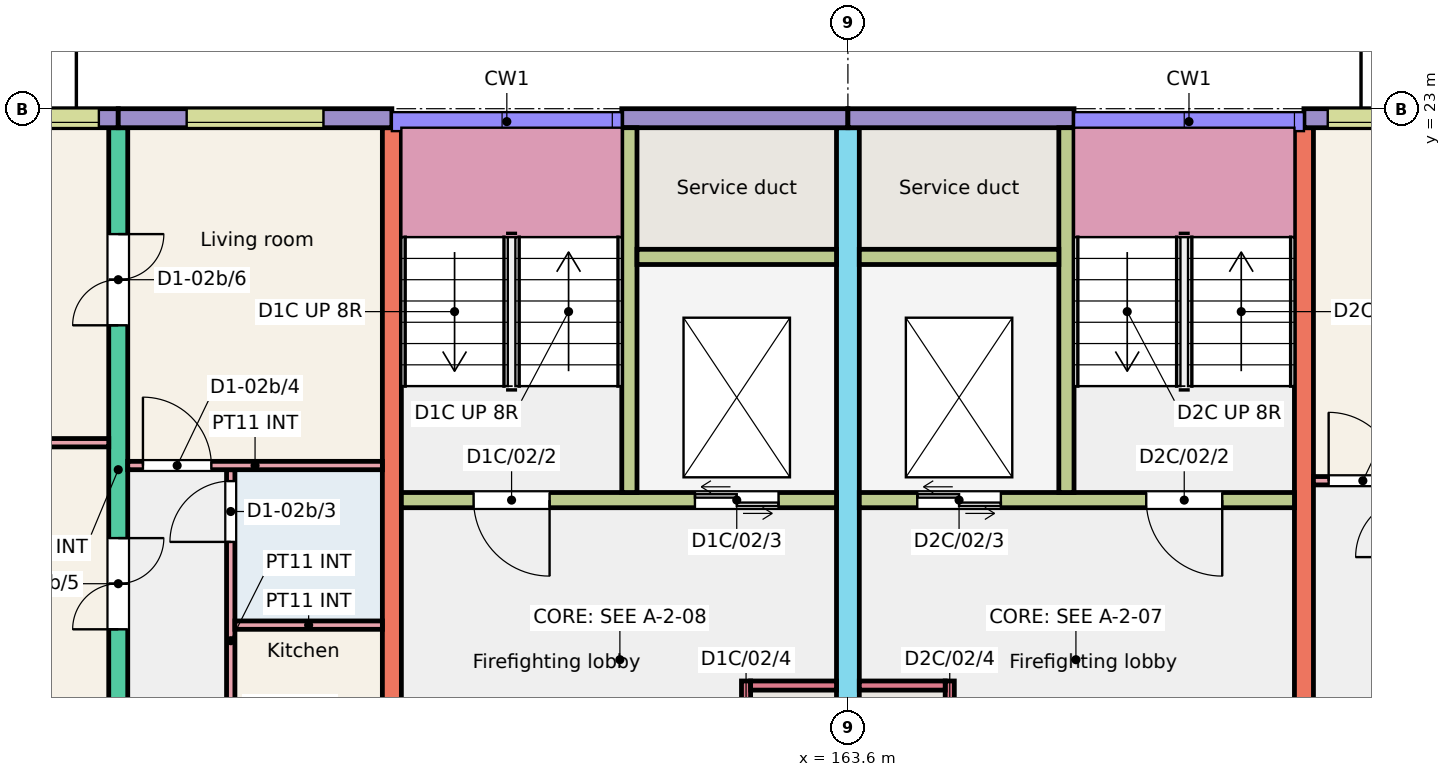
"""IFC4 building model, lengths in metres.
Left out: names, types, materials, properties, quantities, classifications, styles, units other than length and angle.
Written with IfcOpenShell. Run it as: python <this file> out.ifc"""

import sys

from ifc_helpers import new_model, si_unit, direction, frame, frame_2d, origin, place, context, subcontext, project, spatial, rectangle, extrude, element, fill, save


model = new_model("IFC4")
c1 = context("Model", 3, precision=1e-05, world=origin(), true_north=direction((0.0, 1.0)))
c2 = subcontext(c1, "Body", "Model", "MODEL_VIEW")
j1 = project(units=[si_unit("LENGTHUNIT", "METRE"), si_unit("PLANEANGLEUNIT", "RADIAN")], contexts=[c1])
p1 = place(None, origin())
s1 = spatial("IfcSite", under=j1, at=p1, CompositionType="ELEMENT")
p2 = place(p1, origin())
s2 = spatial("IfcBuilding", under=s1, at=p2, CompositionType="ELEMENT")
p3 = place(p2, frame((0.0, 0.0, 6.0)))
s3 = spatial("IfcBuildingStorey", under=s2, at=p3, CompositionType="ELEMENT", Elevation=6.0)
p4 = place(p3, frame((154.0, 13.75, 0.0), z_axis=(0.0, 0.0, 1.0), x_axis=(0.0, 1.0, 0.0)))
e1 = element("IfcWall", 1, at=p4, inside=s3, PredefinedType="SHEAR", context=c2, shape_type="SweptSolid", body=[
    extrude(rectangle(XDim=9.0, YDim=0.25, at=frame_2d((4.5, 0.0))), origin(), (0.0, 0.0, 1.0), 3.0),
])
p5 = place(p4, frame((2.4, 0.0, 0.0)))
e2 = element("IfcOpeningElement", 2, at=p5, cuts=e1, PredefinedType="OPENING", context=c2, shape_type="SweptSolid", body=[
    extrude(rectangle(XDim=1.2, YDim=2.1, at=frame_2d((0.6, 1.05))), frame((0.0, 0.135, 0.0), z_axis=(0.0, -1.0, 0.0), x_axis=(1.0, 0.0, 0.0)), (0.0, 0.0, 1.0), 0.27),
])
p6 = place(p4, frame((6.4, 0.0, 0.0)))
e3 = element("IfcOpeningElement", 3, at=p6, cuts=e1, PredefinedType="OPENING", context=c2, shape_type="SweptSolid", body=[
    extrude(rectangle(XDim=1.2, YDim=2.1, at=frame_2d((0.6, 1.05))), frame((0.0, 0.135, 0.0), z_axis=(0.0, -1.0, 0.0), x_axis=(1.0, 0.0, 0.0)), (0.0, 0.0, 1.0), 0.27),
])
p7 = place(p3, frame((157.6, 13.75, 0.0), z_axis=(0.0, 0.0, 1.0), x_axis=(0.0, 1.0, 0.0)))
e4 = element("IfcWall", 4, at=p7, inside=s3, PredefinedType="SHEAR", context=c2, shape_type="SweptSolid", body=[
    extrude(rectangle(XDim=9.0, YDim=0.25, at=frame_2d((4.5, 0.0))), origin(), (0.0, 0.0, 1.0), 3.0),
])
p8 = place(p3, frame((163.6, 11.75, 0.0), z_axis=(0.0, 0.0, 1.0), x_axis=(0.0, 1.0, 0.0)))
e5 = element("IfcWall", 5, at=p8, inside=s3, PredefinedType="SHEAR", context=c2, shape_type="SweptSolid", body=[
    extrude(rectangle(XDim=11.0, YDim=0.3, at=frame_2d((5.5, 0.0))), origin(), (0.0, 0.0, 1.0), 3.0),
])
p9 = place(p8, frame((0.3, 0.0, 0.0)))
e6 = element("IfcOpeningElement", 6, at=p9, cuts=e5, PredefinedType="OPENING", context=c2, shape_type="SweptSolid", body=[
    extrude(rectangle(XDim=1.2, YDim=2.1, at=frame_2d((0.6, 1.05))), frame((0.0, 0.16, 0.0), z_axis=(0.0, -1.0, 0.0), x_axis=(1.0, 0.0, 0.0)), (0.0, 0.0, 1.0), 0.32),
])
p10 = place(p3, frame((169.6, 13.75, 0.0), z_axis=(0.0, 0.0, 1.0), x_axis=(0.0, 1.0, 0.0)))
e7 = element("IfcWall", 7, at=p10, inside=s3, PredefinedType="SHEAR", context=c2, shape_type="SweptSolid", body=[
    extrude(rectangle(XDim=9.0, YDim=0.25, at=frame_2d((4.5, 0.0))), origin(), (0.0, 0.0, 1.0), 3.0),
])
p11 = place(p3, frame((150.4, 22.875, 0.0), z_axis=(0.0, 0.0, 1.0), x_axis=(1.0, 0.0, 0.0)))
e8 = element("IfcWall", 8, at=p11, inside=s3, PredefinedType="SOLIDWALL", context=c2, shape_type="SweptSolid", body=[
    extrude(rectangle(XDim=3.6, YDim=0.25, at=frame_2d((1.8, 0.0))), origin(), (0.0, 0.0, 1.0), 3.0),
])
p12 = place(p11, frame((1.545, 0.0, 1.1)))
e9 = element("IfcOpeningElement", 9, at=p12, cuts=e8, PredefinedType="OPENING", context=c2, shape_type="SweptSolid", body=[
    extrude(rectangle(XDim=1.8, YDim=1.3, at=frame_2d((0.9, 0.65))), frame((0.0, 0.135, 0.0), z_axis=(0.0, -1.0, 0.0), x_axis=(1.0, 0.0, 0.0)), (0.0, 0.0, 1.0), 0.27),
])
p13 = place(p11, frame((0.315, 0.0, 0.0)))
e10 = element("IfcOpeningElement", 10, at=p13, cuts=e8, PredefinedType="OPENING", context=c2, shape_type="SweptSolid", body=[
    extrude(rectangle(XDim=1.0, YDim=2.1, at=frame_2d((0.5, 1.05))), frame((0.0, 0.135, 0.0), z_axis=(0.0, -1.0, 0.0), x_axis=(1.0, 0.0, 0.0)), (0.0, 0.0, 1.0), 0.27),
])
p14 = place(p3, frame((154.0, 22.875, 0.0), z_axis=(0.0, 0.0, 1.0), x_axis=(1.0, 0.0, 0.0)))
e11 = element("IfcWall", 11, at=p14, inside=s3, PredefinedType="SOLIDWALL", context=c2, shape_type="SweptSolid", body=[
    extrude(rectangle(XDim=3.6, YDim=0.25, at=frame_2d((1.8, 0.0))), origin(), (0.0, 0.0, 1.0), 3.0),
])
p15 = place(p14, frame((0.9, 0.0, 1.1)))
e12 = element("IfcOpeningElement", 12, at=p15, cuts=e11, PredefinedType="OPENING", context=c2, shape_type="SweptSolid", body=[
    extrude(rectangle(XDim=1.8, YDim=1.3, at=frame_2d((0.9, 0.65))), frame((0.0, 0.135, 0.0), z_axis=(0.0, -1.0, 0.0), x_axis=(1.0, 0.0, 0.0)), (0.0, 0.0, 1.0), 0.27),
])
p16 = place(p3, frame((160.625, 22.875, 0.0), z_axis=(0.0, 0.0, 1.0), x_axis=(1.0, 0.0, 0.0)))
e13 = element("IfcWall", 13, at=p16, inside=s3, PredefinedType="SOLIDWALL", context=c2, shape_type="SweptSolid", body=[
    extrude(rectangle(XDim=2.975, YDim=0.25, at=frame_2d((1.488, 0.0))), origin(), (0.0, 0.0, 1.0), 3.0),
])
p17 = place(p3, frame((157.725, 17.85, 0.0), z_axis=(0.0, 0.0, 1.0), x_axis=(1.0, 0.0, 0.0)))
e14 = element("IfcWall", 14, at=p17, inside=s3, PredefinedType="SHEAR", context=c2, shape_type="SweptSolid", body=[
    extrude(rectangle(XDim=5.725, YDim=0.2, at=frame_2d((2.862, 0.0))), origin(), (0.0, 0.0, 1.0), 3.0),
])
p18 = place(p17, frame((0.95, 0.0, 0.0)))
e15 = element("IfcOpeningElement", 15, at=p18, cuts=e14, PredefinedType="OPENING", context=c2, shape_type="SweptSolid", body=[
    extrude(rectangle(XDim=1.0, YDim=2.1, at=frame_2d((0.5, 1.05))), frame((0.0, 0.11, 0.0), z_axis=(0.0, -1.0, 0.0), x_axis=(1.0, 0.0, 0.0)), (0.0, 0.0, 1.0), 0.22),
])
p19 = place(p17, frame((3.863, 0.0, 0.0)))
e16 = element("IfcOpeningElement", 16, at=p19, cuts=e14, PredefinedType="OPENING", context=c2, shape_type="SweptSolid", body=[
    extrude(rectangle(XDim=1.1, YDim=2.1, at=frame_2d((0.55, 1.05))), frame((0.0, 0.11, 0.0), z_axis=(0.0, -1.0, 0.0), x_axis=(1.0, 0.0, 0.0)), (0.0, 0.0, 1.0), 0.22),
])
p20 = place(p3, frame((160.725, 17.95, 0.0), z_axis=(0.0, 0.0, 1.0), x_axis=(0.0, 1.0, 0.0)))
e17 = element("IfcWall", 17, at=p20, inside=s3, PredefinedType="SHEAR", context=c2, shape_type="SweptSolid", body=[
    extrude(rectangle(XDim=4.8, YDim=0.2, at=frame_2d((2.4, 0.0))), origin(), (0.0, 0.0, 1.0), 3.0),
])
p21 = place(p3, frame((160.825, 21.05, 0.0), z_axis=(0.0, 0.0, 1.0), x_axis=(1.0, 0.0, 0.0)))
e18 = element("IfcWall", 18, at=p21, inside=s3, PredefinedType="SHEAR", context=c2, shape_type="SweptSolid", body=[
    extrude(rectangle(XDim=2.625, YDim=0.2, at=frame_2d((1.312, 0.0))), origin(), (0.0, 0.0, 1.0), 3.0),
])
p22 = place(p3, frame((162.26, 13.75, 0.0), z_axis=(0.0, 0.0, 1.0), x_axis=(0.0, 1.0, 0.0)))
e19 = element("IfcWall", 19, at=p22, inside=s3, PredefinedType="SHEAR", context=c2, shape_type="SweptSolid", body=[
    extrude(rectangle(XDim=1.72, YDim=0.12, at=frame_2d((0.86, 0.0))), origin(), (0.0, 0.0, 1.0), 3.0),
])
p23 = place(p22, frame((0.45, 0.0, 0.0)))
e20 = element("IfcOpeningElement", 20, at=p23, cuts=e19, PredefinedType="OPENING", context=c2, shape_type="SweptSolid", body=[
    extrude(rectangle(XDim=0.9, YDim=2.1, at=frame_2d((0.45, 1.05))), frame((0.0, 0.07, 0.0), z_axis=(0.0, -1.0, 0.0), x_axis=(1.0, 0.0, 0.0)), (0.0, 0.0, 1.0), 0.14),
])
p24 = place(p3, frame((162.32, 15.41, 0.0), z_axis=(0.0, 0.0, 1.0), x_axis=(1.0, 0.0, 0.0)))
e21 = element("IfcWall", 21, at=p24, inside=s3, PredefinedType="SHEAR", context=c2, shape_type="SweptSolid", body=[
    extrude(rectangle(XDim=1.13, YDim=0.12, at=frame_2d((0.565, 0.0))), origin(), (0.0, 0.0, 1.0), 3.0),
])
p25 = place(p3, frame((163.6, 22.875, 0.0), z_axis=(0.0, 0.0, 1.0), x_axis=(1.0, 0.0, 0.0)))
e22 = element("IfcWall", 22, at=p25, inside=s3, PredefinedType="SOLIDWALL", context=c2, shape_type="SweptSolid", body=[
    extrude(rectangle(XDim=2.975, YDim=0.25, at=frame_2d((1.487, 0.0))), origin(), (0.0, 0.0, 1.0), 3.0),
])
p26 = place(p3, frame((163.75, 17.85, 0.0), z_axis=(0.0, 0.0, 1.0), x_axis=(1.0, 0.0, 0.0)))
e23 = element("IfcWall", 23, at=p26, inside=s3, PredefinedType="SHEAR", context=c2, shape_type="SweptSolid", body=[
    extrude(rectangle(XDim=5.725, YDim=0.2, at=frame_2d((2.863, 0.0))), origin(), (0.0, 0.0, 1.0), 3.0),
])
p27 = place(p26, frame((3.775, 0.0, 0.0)))
e24 = element("IfcOpeningElement", 24, at=p27, cuts=e23, PredefinedType="OPENING", context=c2, shape_type="SweptSolid", body=[
    extrude(rectangle(XDim=1.0, YDim=2.1, at=frame_2d((0.5, 1.05))), frame((0.0, 0.11, 0.0), z_axis=(0.0, -1.0, 0.0), x_axis=(1.0, 0.0, 0.0)), (0.0, 0.0, 1.0), 0.22),
])
p28 = place(p26, frame((0.762, 0.0, 0.0)))
e25 = element("IfcOpeningElement", 25, at=p28, cuts=e23, PredefinedType="OPENING", context=c2, shape_type="SweptSolid", body=[
    extrude(rectangle(XDim=1.1, YDim=2.1, at=frame_2d((0.55, 1.05))), frame((0.0, 0.11, 0.0), z_axis=(0.0, -1.0, 0.0), x_axis=(1.0, 0.0, 0.0)), (0.0, 0.0, 1.0), 0.22),
])
p29 = place(p3, frame((166.475, 17.95, 0.0), z_axis=(0.0, 0.0, 1.0), x_axis=(0.0, 1.0, 0.0)))
e26 = element("IfcWall", 26, at=p29, inside=s3, PredefinedType="SHEAR", context=c2, shape_type="SweptSolid", body=[
    extrude(rectangle(XDim=4.8, YDim=0.2, at=frame_2d((2.4, 0.0))), origin(), (0.0, 0.0, 1.0), 3.0),
])
p30 = place(p3, frame((163.75, 21.05, 0.0), z_axis=(0.0, 0.0, 1.0), x_axis=(1.0, 0.0, 0.0)))
e27 = element("IfcWall", 27, at=p30, inside=s3, PredefinedType="SHEAR", context=c2, shape_type="SweptSolid", body=[
    extrude(rectangle(XDim=2.625, YDim=0.2, at=frame_2d((1.312, 0.0))), origin(), (0.0, 0.0, 1.0), 3.0),
])
p31 = place(p3, frame((164.94, 13.75, 0.0), z_axis=(0.0, 0.0, 1.0), x_axis=(0.0, 1.0, 0.0)))
e28 = element("IfcWall", 28, at=p31, inside=s3, PredefinedType="SHEAR", context=c2, shape_type="SweptSolid", body=[
    extrude(rectangle(XDim=1.72, YDim=0.12, at=frame_2d((0.86, 0.0))), origin(), (0.0, 0.0, 1.0), 3.0),
])
p32 = place(p31, frame((0.45, 0.0, 0.0)))
e29 = element("IfcOpeningElement", 29, at=p32, cuts=e28, PredefinedType="OPENING", context=c2, shape_type="SweptSolid", body=[
    extrude(rectangle(XDim=0.9, YDim=2.1, at=frame_2d((0.45, 1.05))), frame((0.0, 0.07, 0.0), z_axis=(0.0, -1.0, 0.0), x_axis=(1.0, 0.0, 0.0)), (0.0, 0.0, 1.0), 0.14),
])
p33 = place(p3, frame((163.75, 15.41, 0.0), z_axis=(0.0, 0.0, 1.0), x_axis=(1.0, 0.0, 0.0)))
e30 = element("IfcWall", 30, at=p33, inside=s3, PredefinedType="SHEAR", context=c2, shape_type="SweptSolid", body=[
    extrude(rectangle(XDim=1.13, YDim=0.12, at=frame_2d((0.565, 0.0))), origin(), (0.0, 0.0, 1.0), 3.0),
])
p34 = place(p3, frame((169.6, 22.875, 0.0), z_axis=(0.0, 0.0, 1.0), x_axis=(1.0, 0.0, 0.0)))
e31 = element("IfcWall", 31, at=p34, inside=s3, PredefinedType="SOLIDWALL", context=c2, shape_type="SweptSolid", body=[
    extrude(rectangle(XDim=3.6, YDim=0.25, at=frame_2d((1.8, 0.0))), origin(), (0.0, 0.0, 1.0), 3.0),
])
p35 = place(p34, frame((0.313, 0.0, 1.1)))
e32 = element("IfcOpeningElement", 32, at=p35, cuts=e31, PredefinedType="OPENING", context=c2, shape_type="SweptSolid", body=[
    extrude(rectangle(XDim=1.8, YDim=1.3, at=frame_2d((0.9, 0.65))), frame((0.0, 0.135, 0.0), z_axis=(0.0, -1.0, 0.0), x_axis=(1.0, 0.0, 0.0)), (0.0, 0.0, 1.0), 0.27),
])
p36 = place(p34, frame((2.401, 0.0, 0.0)))
e33 = element("IfcOpeningElement", 33, at=p36, cuts=e31, PredefinedType="OPENING", context=c2, shape_type="SweptSolid", body=[
    extrude(rectangle(XDim=1.0, YDim=2.1, at=frame_2d((0.5, 1.05))), frame((0.0, 0.135, 0.0), z_axis=(0.0, -1.0, 0.0), x_axis=(1.0, 0.0, 0.0)), (0.0, 0.0, 1.0), 0.27),
])
p37 = place(p3, frame((155.48, 13.75, 0.0), z_axis=(0.0, 0.0, 1.0), x_axis=(0.0, 1.0, 0.0)))
e34 = element("IfcWall", 34, at=p37, inside=s3, PredefinedType="PARTITIONING", context=c2, shape_type="SweptSolid", body=[
    extrude(rectangle(XDim=4.5, YDim=0.11, at=frame_2d((2.25, 0.0))), origin(), (0.0, 0.0, 1.0), 2.8),
])
p38 = place(p37, frame((0.2, 0.0, 0.0)))
e35 = element("IfcOpeningElement", 35, at=p38, cuts=e34, PredefinedType="OPENING", context=c2, shape_type="SweptSolid", body=[
    extrude(rectangle(XDim=0.8, YDim=2.1, at=frame_2d((0.4, 1.05))), frame((0.0, 0.065, 0.0), z_axis=(0.0, -1.0, 0.0), x_axis=(1.0, 0.0, 0.0)), (0.0, 0.0, 1.0), 0.13),
])
p39 = place(p37, frame((3.55, 0.0, 0.0)))
e36 = element("IfcOpeningElement", 36, at=p39, cuts=e34, PredefinedType="OPENING", context=c2, shape_type="SweptSolid", body=[
    extrude(rectangle(XDim=0.8, YDim=2.1, at=frame_2d((0.4, 1.05))), frame((0.0, 0.065, 0.0), z_axis=(0.0, -1.0, 0.0), x_axis=(1.0, 0.0, 0.0)), (0.0, 0.0, 1.0), 0.13),
])
p40 = place(p3, frame((155.535, 16.205, 0.0), z_axis=(0.0, 0.0, 1.0), x_axis=(1.0, 0.0, 0.0)))
e37 = element("IfcWall", 37, at=p40, inside=s3, PredefinedType="PARTITIONING", context=c2, shape_type="SweptSolid", body=[
    extrude(rectangle(XDim=1.94, YDim=0.11, at=frame_2d((0.97, 0.0))), origin(), (0.0, 0.0, 1.0), 2.8),
])
p41 = place(p3, frame((154.125, 18.305, 0.0), z_axis=(0.0, 0.0, 1.0), x_axis=(1.0, 0.0, 0.0)))
e38 = element("IfcWall", 38, at=p41, inside=s3, PredefinedType="PARTITIONING", context=c2, shape_type="SweptSolid", body=[
    extrude(rectangle(XDim=3.35, YDim=0.11, at=frame_2d((1.675, 0.0))), origin(), (0.0, 0.0, 1.0), 2.8),
])
p42 = place(p41, frame((0.2, 0.0, 0.0)))
e39 = element("IfcOpeningElement", 39, at=p42, cuts=e38, PredefinedType="OPENING", context=c2, shape_type="SweptSolid", body=[
    extrude(rectangle(XDim=0.9, YDim=2.1, at=frame_2d((0.45, 1.05))), frame((0.0, 0.065, 0.0), z_axis=(0.0, -1.0, 0.0), x_axis=(1.0, 0.0, 0.0)), (0.0, 0.0, 1.0), 0.13),
])
p43 = place(p3, frame((150.5, 18.605, 0.0), z_axis=(0.0, 0.0, 1.0), x_axis=(1.0, 0.0, 0.0)))
e40 = element("IfcWall", 40, at=p43, inside=s3, PredefinedType="PARTITIONING", context=c2, shape_type="SweptSolid", body=[
    extrude(rectangle(XDim=3.375, YDim=0.11, at=frame_2d((1.688, 0.0))), origin(), (0.0, 0.0, 1.0), 2.8),
])
p44 = place(p3, frame((169.725, 18.105, 0.0), z_axis=(0.0, 0.0, 1.0), x_axis=(1.0, 0.0, 0.0)))
e41 = element("IfcWall", 41, at=p44, inside=s3, PredefinedType="PARTITIONING", context=c2, shape_type="SweptSolid", body=[
    extrude(rectangle(XDim=3.35, YDim=0.11, at=frame_2d((1.675, 0.0))), origin(), (0.0, 0.0, 1.0), 2.8),
])
p45 = place(p44, frame((0.2, 0.0, 0.0)))
e42 = element("IfcOpeningElement", 42, at=p45, cuts=e41, PredefinedType="OPENING", context=c2, shape_type="SweptSolid", body=[
    extrude(rectangle(XDim=0.9, YDim=2.1, at=frame_2d((0.45, 1.05))), frame((0.0, 0.065, 0.0), z_axis=(0.0, -1.0, 0.0), x_axis=(1.0, 0.0, 0.0)), (0.0, 0.0, 1.0), 0.13),
])
p46 = place(p12, origin())
e43 = element("IfcWindow", 43, at=p46, inside=s3, PartitioningType="SINGLE_PANEL", PredefinedType="WINDOW", context=c2, shape_type="SweptSolid", body=[
    extrude(rectangle(XDim=1.8, YDim=1.3, at=frame_2d((0.9, 0.65))), frame((0.0, -0.025, 0.0), z_axis=(0.0, -1.0, 0.0), x_axis=(1.0, 0.0, 0.0)), (0.0, 0.0, 1.0), 0.06),
])
fill(e9, e43)
p47 = place(p15, origin())
e44 = element("IfcWindow", 44, at=p47, inside=s3, PartitioningType="SINGLE_PANEL", PredefinedType="WINDOW", context=c2, shape_type="SweptSolid", body=[
    extrude(rectangle(XDim=1.8, YDim=1.3, at=frame_2d((0.9, 0.65))), frame((0.0, -0.025, 0.0), z_axis=(0.0, -1.0, 0.0), x_axis=(1.0, 0.0, 0.0)), (0.0, 0.0, 1.0), 0.06),
])
fill(e12, e44)
p48 = place(p35, origin())
e45 = element("IfcWindow", 45, at=p48, inside=s3, PartitioningType="SINGLE_PANEL", PredefinedType="WINDOW", context=c2, shape_type="SweptSolid", body=[
    extrude(rectangle(XDim=1.8, YDim=1.3, at=frame_2d((0.9, 0.65))), frame((0.0, -0.025, 0.0), z_axis=(0.0, -1.0, 0.0), x_axis=(1.0, 0.0, 0.0)), (0.0, 0.0, 1.0), 0.06),
])
fill(e32, e45)
p49 = place(p39, origin())
e46 = element("IfcDoor", 46, at=p49, inside=s3, OperationType="SINGLE_SWING_LEFT", PredefinedType="DOOR", context=c2, shape_type="SweptSolid", body=[
    extrude(rectangle(XDim=0.8, YDim=2.1, at=frame_2d((0.4, 1.05))), frame((0.0, 0.025, 0.0), z_axis=(0.0, -1.0, 0.0), x_axis=(1.0, 0.0, 0.0)), (0.0, 0.0, 1.0), 0.05),
])
fill(e36, e46)
p50 = place(p42, origin())
e47 = element("IfcDoor", 47, at=p50, inside=s3, OperationType="SINGLE_SWING_LEFT", PredefinedType="DOOR", context=c2, shape_type="SweptSolid", body=[
    extrude(rectangle(XDim=0.9, YDim=2.1, at=frame_2d((0.45, 1.05))), frame((0.0, 0.025, 0.0), z_axis=(0.0, -1.0, 0.0), x_axis=(1.0, 0.0, 0.0)), (0.0, 0.0, 1.0), 0.05),
])
fill(e39, e47)
p51 = place(p5, origin())
e48 = element("IfcDoor", 48, at=p51, inside=s3, OperationType="DOUBLE_DOOR_SINGLE_SWING", PredefinedType="DOOR", context=c2, shape_type="SweptSolid", body=[
    extrude(rectangle(XDim=1.2, YDim=2.1, at=frame_2d((0.6, 1.05))), frame((0.0, 0.025, 0.0), z_axis=(0.0, -1.0, 0.0), x_axis=(1.0, 0.0, 0.0)), (0.0, 0.0, 1.0), 0.05),
])
fill(e2, e48)
p52 = place(p6, origin())
e49 = element("IfcDoor", 49, at=p52, inside=s3, OperationType="DOUBLE_DOOR_SINGLE_SWING", PredefinedType="DOOR", context=c2, shape_type="SweptSolid", body=[
    extrude(rectangle(XDim=1.2, YDim=2.1, at=frame_2d((0.6, 1.05))), frame((0.0, 0.025, 0.0), z_axis=(0.0, -1.0, 0.0), x_axis=(1.0, 0.0, 0.0)), (0.0, 0.0, 1.0), 0.05),
])
fill(e3, e49)
p53 = place(p45, origin())
e50 = element("IfcDoor", 50, at=p53, inside=s3, OperationType="SINGLE_SWING_LEFT", PredefinedType="DOOR", context=c2, shape_type="SweptSolid", body=[
    extrude(rectangle(XDim=0.9, YDim=2.1, at=frame_2d((0.45, 1.05))), frame((0.0, 0.025, 0.0), z_axis=(0.0, -1.0, 0.0), x_axis=(1.0, 0.0, 0.0)), (0.0, 0.0, 1.0), 0.05),
])
fill(e42, e50)
p54 = place(p18, origin())
e51 = element("IfcDoor", 51, at=p54, inside=s3, OperationType="SINGLE_SWING_RIGHT", PredefinedType="DOOR", context=c2, shape_type="SweptSolid", body=[
    extrude(rectangle(XDim=1.0, YDim=2.1, at=frame_2d((0.5, 1.05))), frame((0.0, 0.025, 0.0), z_axis=(0.0, -1.0, 0.0), x_axis=(1.0, 0.0, 0.0)), (0.0, 0.0, 1.0), 0.05),
])
fill(e15, e51)
p55 = place(p19, origin())
e52 = element("IfcDoor", 52, at=p55, inside=s3, OperationType="DOUBLE_DOOR_SLIDING", PredefinedType="DOOR", context=c2, shape_type="SweptSolid", body=[
    extrude(rectangle(XDim=1.1, YDim=2.1, at=frame_2d((0.55, 1.05))), frame((0.0, 0.025, 0.0), z_axis=(0.0, -1.0, 0.0), x_axis=(1.0, 0.0, 0.0)), (0.0, 0.0, 1.0), 0.05),
])
fill(e16, e52)
p56 = place(p27, origin())
e53 = element("IfcDoor", 53, at=p56, inside=s3, OperationType="SINGLE_SWING_RIGHT", PredefinedType="DOOR", context=c2, shape_type="SweptSolid", body=[
    extrude(rectangle(XDim=1.0, YDim=2.1, at=frame_2d((0.5, 1.05))), frame((0.0, 0.025, 0.0), z_axis=(0.0, -1.0, 0.0), x_axis=(1.0, 0.0, 0.0)), (0.0, 0.0, 1.0), 0.05),
])
fill(e24, e53)
p57 = place(p28, origin())
e54 = element("IfcDoor", 54, at=p57, inside=s3, OperationType="DOUBLE_DOOR_SLIDING", PredefinedType="DOOR", context=c2, shape_type="SweptSolid", body=[
    extrude(rectangle(XDim=1.1, YDim=2.1, at=frame_2d((0.55, 1.05))), frame((0.0, 0.025, 0.0), z_axis=(0.0, -1.0, 0.0), x_axis=(1.0, 0.0, 0.0)), (0.0, 0.0, 1.0), 0.05),
])
fill(e25, e54)
save(model, sys.argv[1])
